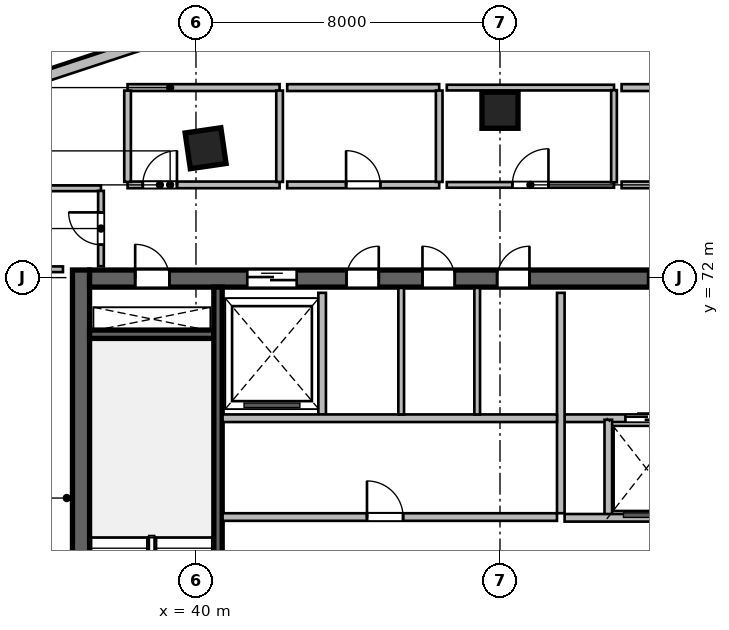
"""IFC4 building model, lengths in metres.
Left out: names, types, materials, properties, quantities, classifications, styles, units other than length and angle.
Written with IfcOpenShell. Run it as: python <this file> out.ifc"""

import sys

from ifc_helpers import new_model, si_unit, direction, frame, frame_2d, origin, origin_2d, place, context, subcontext, project, spatial, rectangle, extrude, source, transform, mapped, element, fill, save


model = new_model("IFC4")
c1 = context("Model", 3, precision=1e-05, world=origin(), true_north=direction((0.0, 1.0)))
c2 = subcontext(c1, "Body", "Model", "MODEL_VIEW")
j1 = project(units=[si_unit("LENGTHUNIT", "METRE"), si_unit("PLANEANGLEUNIT", "RADIAN")], contexts=[c1])
p1 = place(None, origin())
s1 = spatial("IfcSite", under=j1, at=p1, CompositionType="ELEMENT")
p2 = place(p1, origin())
s2 = spatial("IfcBuilding", under=s1, at=p2, CompositionType="ELEMENT")
p3 = place(p2, frame((0.0, 0.0, 239.1)))
s3 = spatial("IfcBuildingStorey", under=s2, at=p3, CompositionType="ELEMENT", Elevation=239.1)
m1 = source(origin(), c2, "Body", "SweptSolid", [
    extrude(rectangle(XDim=12.0, YDim=0.45, at=frame_2d((6.0, 0.0))), origin(), (0.0, 0.0, 1.0), 3.9),
])
p4 = place(p3, frame((36.975, 60.2, 0.0), z_axis=(0.0, 0.0, 1.0), x_axis=(0.0, 1.0, 0.0)))
e1 = element("IfcWall", 1, at=p4, inside=s3, PredefinedType="SHEAR", context=c2, shape_type="MappedRepresentation", body=[
    mapped(m1, transform((0.0, 0.0, 0.0), scale=1.0)),
])
m2 = source(origin(), c2, "Body", "SweptSolid", [
    extrude(rectangle(XDim=21.6, YDim=0.45, at=frame_2d((10.8, 0.0))), origin(), (0.0, 0.0, 1.0), 3.9),
])
p5 = place(p3, frame((37.2, 71.975, 0.0), z_axis=(0.0, 0.0, 1.0), x_axis=(1.0, 0.0, 0.0)))
e2 = element("IfcWall", 2, at=p5, inside=s3, PredefinedType="SHEAR", context=c2, shape_type="MappedRepresentation", body=[
    mapped(m2, transform((0.0, 0.0, 0.0), scale=1.0)),
])
p6 = place(p5, frame((1.2, 0.0, 0.0)))
e3 = element("IfcOpeningElement", 3, at=p6, cuts=e2, PredefinedType="OPENING", context=c2, shape_type="SweptSolid", body=[
    extrude(rectangle(XDim=0.9, YDim=2.1, at=frame_2d((0.45, 1.05))), frame((0.0, 0.235, 0.0), z_axis=(0.0, -1.0, 0.0), x_axis=(1.0, 0.0, 0.0)), (0.0, 0.0, 1.0), 0.47),
])
p7 = place(p5, frame((14.7, 0.0, 0.0)))
e4 = element("IfcOpeningElement", 4, at=p7, cuts=e2, PredefinedType="OPENING", context=c2, shape_type="SweptSolid", body=[
    extrude(rectangle(XDim=1.2, YDim=2.15, at=frame_2d((0.6, 1.075))), frame((0.0, 0.235, 0.0), z_axis=(0.0, -1.0, 0.0), x_axis=(1.0, 0.0, 0.0)), (0.0, 0.0, 1.0), 0.47),
])
p8 = place(p5, frame((4.15, 0.0, 0.0)))
e5 = element("IfcOpeningElement", 5, at=p8, cuts=e2, PredefinedType="OPENING", context=c2, shape_type="SweptSolid", body=[
    extrude(rectangle(XDim=1.3, YDim=2.15, at=frame_2d((0.65, 1.075))), frame((0.0, 0.235, 0.0), z_axis=(0.0, -1.0, 0.0), x_axis=(1.0, 0.0, 0.0)), (0.0, 0.0, 1.0), 0.47),
])
p9 = place(p5, frame((6.76, 0.0, 0.0)))
e6 = element("IfcOpeningElement", 6, at=p9, cuts=e2, PredefinedType="OPENING", context=c2, shape_type="SweptSolid", body=[
    extrude(rectangle(XDim=0.85, YDim=2.1, at=frame_2d((0.425, 1.05))), frame((0.0, 0.235, 0.0), z_axis=(0.0, -1.0, 0.0), x_axis=(1.0, 0.0, 0.0)), (0.0, 0.0, 1.0), 0.47),
])
p10 = place(p5, frame((8.76, 0.0, 0.0)))
e7 = element("IfcOpeningElement", 7, at=p10, cuts=e2, PredefinedType="OPENING", context=c2, shape_type="SweptSolid", body=[
    extrude(rectangle(XDim=0.85, YDim=2.1, at=frame_2d((0.425, 1.05))), frame((0.0, 0.235, 0.0), z_axis=(0.0, -1.0, 0.0), x_axis=(1.0, 0.0, 0.0)), (0.0, 0.0, 1.0), 0.47),
])
p11 = place(p5, frame((10.725, 0.0, 0.0)))
e8 = element("IfcOpeningElement", 8, at=p11, cuts=e2, PredefinedType="OPENING", context=c2, shape_type="SweptSolid", body=[
    extrude(rectangle(XDim=0.85, YDim=2.1, at=frame_2d((0.425, 1.05))), frame((0.0, 0.235, 0.0), z_axis=(0.0, -1.0, 0.0), x_axis=(1.0, 0.0, 0.0)), (0.0, 0.0, 1.0), 0.47),
])
m3 = source(origin(), c2, "Body", "SweptSolid", [
    extrude(rectangle(XDim=3.27, YDim=0.22, at=frame_2d((1.635, 0.0))), origin(), (0.0, 0.0, 1.0), 3.9),
])
p12 = place(p3, frame((37.2, 70.51, 0.0), z_axis=(0.0, 0.0, 1.0), x_axis=(1.0, 0.0, 0.0)))
e9 = element("IfcWall", 9, at=p12, inside=s3, PredefinedType="SHEAR", context=c2, shape_type="MappedRepresentation", body=[
    mapped(m3, transform((0.0, 0.0, 0.0), scale=1.0)),
])
m4 = source(origin(), c2, "Body", "SweptSolid", [
    extrude(rectangle(XDim=11.1, YDim=0.22, at=frame_2d((5.55, 0.0))), origin(), (0.0, 0.0, 1.0), 3.9),
])
p13 = place(p3, frame((40.58, 60.65, 0.0), z_axis=(0.0, 0.0, 1.0), x_axis=(0.0, 1.0, 0.0)))
e10 = element("IfcWall", 10, at=p13, inside=s3, PredefinedType="SHEAR", context=c2, shape_type="MappedRepresentation", body=[
    mapped(m4, transform((0.0, 0.0, 0.0), scale=1.0)),
])
m5 = source(origin(), c2, "Body", "SweptSolid", [
    extrude(rectangle(XDim=0.95, YDim=0.95, at=origin_2d()), origin(), (0.0, 0.0, 1.0), 3.9),
])
for number, where, z_axis, x_axis in (
    (11, (40.253, 75.404, 0.0), (0.0, 0.0, 1.0), (-0.143, 0.99, 0.0)),
    (12, (48.0, 76.404, 0.0), (0.0, 0.0, 1.0), (0.0, 1.0, 0.0)),
):
    element("IfcColumn", number, at=place(p3, frame(where, z_axis=z_axis, x_axis=x_axis)), inside=s3, PredefinedType="COLUMN", context=c2, shape_type="MappedRepresentation", body=[
        mapped(m5, transform((0.0, 0.0, 0.0), scale=1.0)),
    ])
m6 = source(origin(), c2, "Body", "SweptSolid", [
    extrude(rectangle(XDim=3.557, YDim=0.28, at=frame_2d((1.778, 0.0))), origin(), (0.0, 0.0, 1.0), 3.65),
])
p14 = place(p3, frame((36.077, 77.307, 0.0), z_axis=(0.0, 0.0, 1.0), x_axis=(0.949687460385, 0.31319918197, 0.0)))
e13 = element("IfcWall", 13, at=p14, inside=s3, PredefinedType="SOLIDWALL", context=c2, shape_type="MappedRepresentation", body=[
    mapped(m6, transform((0.0, 0.0, 0.0), scale=1.0)),
])
m7 = source(origin(), c2, "Body", "SweptSolid", [
    extrude(rectangle(XDim=5.62, YDim=0.2, at=frame_2d((2.81, 0.0))), origin(), (0.0, 0.0, 1.0), 3.65),
])
p15 = place(p3, frame((49.7, 68.3, 0.0), z_axis=(0.0, 0.0, 1.0), x_axis=(1.0, 0.0, 0.0)))
e14 = element("IfcWall", 14, at=p15, inside=s3, PredefinedType="SOLIDWALL", context=c2, shape_type="MappedRepresentation", body=[
    mapped(m7, transform((0.0, 0.0, 0.0), scale=1.0)),
])
p16 = place(p15, frame((1.6, 0.0, 0.0)))
e15 = element("IfcOpeningElement", 15, at=p16, cuts=e14, PredefinedType="OPENING", context=c2, shape_type="SweptSolid", body=[
    extrude(rectangle(XDim=1.1, YDim=2.15, at=frame_2d((0.55, 1.075))), frame((0.0, 0.11, 0.0), z_axis=(0.0, -1.0, 0.0), x_axis=(1.0, 0.0, 0.0)), (0.0, 0.0, 1.0), 0.22),
])
p17 = place(p15, frame((3.7, 0.0, 0.0)))
e16 = element("IfcOpeningElement", 16, at=p17, cuts=e14, PredefinedType="OPENING", context=c2, shape_type="SweptSolid", body=[
    extrude(rectangle(XDim=1.1, YDim=2.15, at=frame_2d((0.55, 1.075))), frame((0.0, 0.11, 0.0), z_axis=(0.0, -1.0, 0.0), x_axis=(1.0, 0.0, 0.0)), (0.0, 0.0, 1.0), 0.22),
])
m8 = source(origin(), c2, "Body", "SweptSolid", [
    extrude(rectangle(XDim=5.8, YDim=0.2, at=frame_2d((2.9, 0.0))), origin(), (0.0, 0.0, 1.0), 3.65),
])
p18 = place(p3, frame((49.6, 65.8, 0.0), z_axis=(0.0, 0.0, 1.0), x_axis=(0.0, 1.0, 0.0)))
e17 = element("IfcWall", 17, at=p18, inside=s3, PredefinedType="SOLIDWALL", context=c2, shape_type="MappedRepresentation", body=[
    mapped(m8, transform((0.0, 0.0, 0.0), scale=1.0)),
])
m9 = source(origin(), c2, "Body", "SweptSolid", [
    extrude(rectangle(XDim=2.58, YDim=0.2, at=frame_2d((1.29, 0.0))), origin(), (0.0, 0.0, 1.0), 3.65),
])
p19 = place(p3, frame((50.85, 65.68, 0.0), z_axis=(0.0, 0.0, 1.0), x_axis=(0.0, 1.0, 0.0)))
e18 = element("IfcWall", 18, at=p19, inside=s3, PredefinedType="SOLIDWALL", context=c2, shape_type="MappedRepresentation", body=[
    mapped(m9, transform((0.0, 0.0, 0.0), scale=1.0)),
])
p20 = place(p3, frame((49.7, 65.68, 0.0), z_axis=(0.0, 0.0, 1.0), x_axis=(1.0, 0.0, 0.0)))
e19 = element("IfcWall", 19, at=p20, inside=s3, PredefinedType="SOLIDWALL", context=c2, shape_type="MappedRepresentation", body=[
    mapped(m7, transform((0.0, 0.0, 0.0), scale=1.0)),
])
m10 = source(origin(), c2, "Body", "SweptSolid", [
    extrude(rectangle(XDim=3.2, YDim=0.2, at=frame_2d((1.6, 0.0))), origin(), (0.0, 0.0, 1.0), 3.65),
])
p21 = place(p3, frame((43.32, 68.4, 0.0), z_axis=(0.0, 0.0, 1.0), x_axis=(0.0, 1.0, 0.0)))
e20 = element("IfcWall", 20, at=p21, inside=s3, PredefinedType="SOLIDWALL", context=c2, shape_type="MappedRepresentation", body=[
    mapped(m10, transform((0.0, 0.0, 0.0), scale=1.0)),
])
m11 = source(origin(), c2, "Body", "SweptSolid", [
    extrude(rectangle(XDim=8.8, YDim=0.2, at=frame_2d((4.4, 0.0))), origin(), (0.0, 0.0, 1.0), 3.65),
])
p22 = place(p3, frame((40.7, 68.3, 0.0), z_axis=(0.0, 0.0, 1.0), x_axis=(1.0, 0.0, 0.0)))
e21 = element("IfcWall", 21, at=p22, inside=s3, PredefinedType="SOLIDWALL", context=c2, shape_type="MappedRepresentation", body=[
    mapped(m11, transform((0.0, 0.0, 0.0), scale=1.0)),
])
m12 = source(origin(), c2, "Body", "SweptSolid", [
    extrude(rectangle(XDim=3.33, YDim=0.15, at=frame_2d((1.665, 0.0))), origin(), (0.0, 0.0, 1.0), 3.65),
])
for number, where, z_axis, x_axis in (
    (22, (45.4, 68.4, 0.0), (0.0, 0.0, 1.0), (0.0, 1.0, 0.0)),
    (23, (47.4, 68.4, 0.0), (0.0, 0.0, 1.0), (0.0, 1.0, 0.0)),
):
    element("IfcWall", number, at=place(p3, frame(where, z_axis=z_axis, x_axis=x_axis)), inside=s3, PredefinedType="PARTITIONING", context=c2, shape_type="MappedRepresentation", body=[
        mapped(m12, transform((0.0, 0.0, 0.0), scale=1.0)),
    ])
p23 = place(p3, frame((40.7, 65.7, 0.0), z_axis=(0.0, 0.0, 1.0), x_axis=(1.0, 0.0, 0.0)))
e24 = element("IfcWall", 24, at=p23, inside=s3, PredefinedType="SOLIDWALL", context=c2, shape_type="MappedRepresentation", body=[
    mapped(m11, transform((0.0, 0.0, 0.0), scale=1.0)),
])
p24 = place(p23, frame((3.8, 0.0, 0.0)))
e25 = element("IfcOpeningElement", 25, at=p24, cuts=e24, PredefinedType="OPENING", context=c2, shape_type="SweptSolid", body=[
    extrude(rectangle(XDim=0.95, YDim=2.15, at=frame_2d((0.475, 1.075))), frame((0.0, 0.11, 0.0), z_axis=(0.0, -1.0, 0.0), x_axis=(1.0, 0.0, 0.0)), (0.0, 0.0, 1.0), 0.22),
])
m13 = source(origin(), c2, "Body", "SweptSolid", [
    extrude(rectangle(XDim=2.1, YDim=0.15, at=frame_2d((1.05, 0.0))), origin(), (0.0, 0.0, 1.0), 3.65),
])
p25 = place(p3, frame((34.4, 72.22, 0.0), z_axis=(0.0, 0.0, 1.0), x_axis=(1.0, 0.0, 0.0)))
e26 = element("IfcWall", 26, at=p25, inside=s3, PredefinedType="PARTITIONING", context=c2, shape_type="MappedRepresentation", body=[
    mapped(m13, transform((0.0, 0.0, 0.0), scale=1.0)),
])
m14 = source(origin(), c2, "Body", "SweptSolid", [
    extrude(rectangle(XDim=3.1, YDim=0.15, at=frame_2d((1.55, 0.0))), origin(), (0.0, 0.0, 1.0), 3.081),
])
p26 = place(p3, frame((34.4, 74.35, 0.0), z_axis=(0.0, 0.0, 1.0), x_axis=(1.0, 0.0, 0.0)))
e27 = element("IfcWall", 27, at=p26, inside=s3, PredefinedType="PARTITIONING", context=c2, shape_type="MappedRepresentation", body=[
    mapped(m14, transform((0.0, 0.0, 0.0), scale=1.0)),
])
m15 = source(origin(), c2, "Body", "SweptSolid", [
    extrude(rectangle(XDim=1.982, YDim=0.15, at=frame_2d((0.991, 0.0))), origin(), (0.0, 0.0, 1.0), 3.65),
])
p27 = place(p3, frame((37.5, 72.3, 0.0), z_axis=(0.0, 0.0, 1.0), x_axis=(0.0, 1.0, 0.0)))
e28 = element("IfcWall", 28, at=p27, inside=s3, PredefinedType="PARTITIONING", context=c2, shape_type="MappedRepresentation", body=[
    mapped(m15, transform((0.0, 0.0, 0.0), scale=1.0)),
])
p28 = place(p27, frame((0.566, 0.0, 0.0)))
e29 = element("IfcOpeningElement", 29, at=p28, cuts=e28, PredefinedType="OPENING", context=c2, shape_type="SweptSolid", body=[
    extrude(rectangle(XDim=0.85, YDim=2.1, at=frame_2d((0.425, 1.05))), frame((0.0, 0.085, 0.0), z_axis=(0.0, -1.0, 0.0), x_axis=(1.0, 0.0, 0.0)), (0.0, 0.0, 1.0), 0.17),
])
m16 = source(origin(), c2, "Body", "SweptSolid", [
    extrude(rectangle(XDim=4.0, YDim=0.175, at=frame_2d((2.0, 0.0))), origin(), (0.0, 0.0, 1.0), 3.65),
])
p29 = place(p3, frame((38.2, 74.44, 0.0), z_axis=(0.0, 0.0, 1.0), x_axis=(1.0, 0.0, 0.0)))
e30 = element("IfcWall", 30, at=p29, inside=s3, PredefinedType="PARTITIONING", context=c2, shape_type="MappedRepresentation", body=[
    mapped(m16, transform((0.0, 0.0, 0.0), scale=1.0)),
])
p30 = place(p29, frame((0.4, 0.0, 0.0)))
e31 = element("IfcOpeningElement", 31, at=p30, cuts=e30, PredefinedType="OPENING", context=c2, shape_type="SweptSolid", body=[
    extrude(rectangle(XDim=0.9, YDim=2.08, at=frame_2d((0.45, 1.04))), frame((0.0, 0.098, 0.0), z_axis=(0.0, -1.0, 0.0), x_axis=(1.0, 0.0, 0.0)), (0.0, 0.0, 1.0), 0.195),
])
m17 = source(origin(), c2, "Body", "SweptSolid", [
    extrude(rectangle(XDim=4.0, YDim=0.18, at=frame_2d((2.0, 0.0))), origin(), (0.0, 0.0, 1.0), 3.65),
])
p31 = place(p3, frame((38.2, 77.0, 0.0), z_axis=(0.0, 0.0, 1.0), x_axis=(1.0, 0.0, 0.0)))
e32 = element("IfcWall", 32, at=p31, inside=s3, PredefinedType="PLUMBINGWALL", context=c2, shape_type="MappedRepresentation", body=[
    mapped(m17, transform((0.0, 0.0, 0.0), scale=1.0)),
])
m18 = source(origin(), c2, "Body", "SweptSolid", [
    extrude(rectangle(XDim=2.403, YDim=0.175, at=frame_2d((1.201, 0.0))), origin(), (0.0, 0.0, 1.0), 3.65),
])
for number, where, z_axis, x_axis in (
    (33, (38.2, 74.519, 0.0), (0.0, 0.0, 1.0), (0.0, 1.0, 0.0)),
    (34, (42.2, 74.519, 0.0), (0.0, 0.0, 1.0), (0.0, 1.0, 0.0)),
):
    element("IfcWall", number, at=place(p3, frame(where, z_axis=z_axis, x_axis=x_axis)), inside=s3, PredefinedType="PARTITIONING", context=c2, shape_type="MappedRepresentation", body=[
        mapped(m18, transform((0.0, 0.0, 0.0), scale=1.0)),
    ])
p32 = place(p3, frame((42.4, 74.44, 0.0), z_axis=(0.0, 0.0, 1.0), x_axis=(1.0, 0.0, 0.0)))
e35 = element("IfcWall", 35, at=p32, inside=s3, PredefinedType="PARTITIONING", context=c2, shape_type="MappedRepresentation", body=[
    mapped(m16, transform((0.0, 0.0, 0.0), scale=1.0)),
])
p33 = place(p32, frame((1.55, 0.0, 0.0)))
e36 = element("IfcOpeningElement", 36, at=p33, cuts=e35, PredefinedType="OPENING", context=c2, shape_type="SweptSolid", body=[
    extrude(rectangle(XDim=0.9, YDim=2.08, at=frame_2d((0.45, 1.04))), frame((0.0, 0.098, 0.0), z_axis=(0.0, -1.0, 0.0), x_axis=(1.0, 0.0, 0.0)), (0.0, 0.0, 1.0), 0.195),
])
p34 = place(p3, frame((42.4, 77.0, 0.0), z_axis=(0.0, 0.0, 1.0), x_axis=(1.0, 0.0, 0.0)))
e37 = element("IfcWall", 37, at=p34, inside=s3, PredefinedType="PLUMBINGWALL", context=c2, shape_type="MappedRepresentation", body=[
    mapped(m17, transform((0.0, 0.0, 0.0), scale=1.0)),
])
p35 = place(p3, frame((46.4, 74.519, 0.0), z_axis=(0.0, 0.0, 1.0), x_axis=(0.0, 1.0, 0.0)))
e38 = element("IfcWall", 38, at=p35, inside=s3, PredefinedType="PARTITIONING", context=c2, shape_type="MappedRepresentation", body=[
    mapped(m18, transform((0.0, 0.0, 0.0), scale=1.0)),
])
m19 = source(origin(), c2, "Body", "SweptSolid", [
    extrude(rectangle(XDim=4.4, YDim=0.15, at=frame_2d((2.2, 0.0))), origin(), (0.0, 0.0, 1.0), 3.65),
])
p36 = place(p3, frame((46.6, 74.44, 0.0), z_axis=(0.0, 0.0, 1.0), x_axis=(1.0, 0.0, 0.0)))
e39 = element("IfcWall", 39, at=p36, inside=s3, PredefinedType="PARTITIONING", context=c2, shape_type="MappedRepresentation", body=[
    mapped(m19, transform((0.0, 0.0, 0.0), scale=1.0)),
])
p37 = place(p36, frame((1.725, 0.0, 0.0)))
e40 = element("IfcOpeningElement", 40, at=p37, cuts=e39, PredefinedType="OPENING", context=c2, shape_type="SweptSolid", body=[
    extrude(rectangle(XDim=0.95, YDim=2.1, at=frame_2d((0.475, 1.05))), frame((0.0, 0.085, 0.0), z_axis=(0.0, -1.0, 0.0), x_axis=(1.0, 0.0, 0.0)), (0.0, 0.0, 1.0), 0.17),
])
p38 = place(p3, frame((46.6, 77.0, 0.0), z_axis=(0.0, 0.0, 1.0), x_axis=(1.0, 0.0, 0.0)))
e41 = element("IfcWall", 41, at=p38, inside=s3, PredefinedType="PARTITIONING", context=c2, shape_type="MappedRepresentation", body=[
    mapped(m19, transform((0.0, 0.0, 0.0), scale=1.0)),
])
m20 = source(origin(), c2, "Body", "SweptSolid", [
    extrude(rectangle(XDim=2.425, YDim=0.15, at=frame_2d((1.212, 0.0))), origin(), (0.0, 0.0, 1.0), 3.65),
])
p39 = place(p3, frame((51.0, 74.508, 0.0), z_axis=(0.0, 0.0, 1.0), x_axis=(0.0, 1.0, 0.0)))
e42 = element("IfcWall", 42, at=p39, inside=s3, PredefinedType="PARTITIONING", context=c2, shape_type="MappedRepresentation", body=[
    mapped(m20, transform((0.0, 0.0, 0.0), scale=1.0)),
])
m21 = source(origin(), c2, "Body", "SweptSolid", [
    extrude(rectangle(XDim=4.2, YDim=0.175, at=frame_2d((2.1, 0.0))), origin(), (0.0, 0.0, 1.0), 3.65),
])
p40 = place(p3, frame((51.2, 74.44, 0.0), z_axis=(0.0, 0.0, 1.0), x_axis=(1.0, 0.0, 0.0)))
e43 = element("IfcWall", 43, at=p40, inside=s3, PredefinedType="PARTITIONING", context=c2, shape_type="MappedRepresentation", body=[
    mapped(m21, transform((0.0, 0.0, 0.0), scale=1.0)),
])
p41 = place(p40, frame((1.625, 0.0, 0.0)))
e44 = element("IfcOpeningElement", 44, at=p41, cuts=e43, PredefinedType="OPENING", context=c2, shape_type="SweptSolid", body=[
    extrude(rectangle(XDim=0.95, YDim=2.12, at=frame_2d((0.475, 1.06))), frame((0.0, 0.098, 0.0), z_axis=(0.0, -1.0, 0.0), x_axis=(1.0, 0.0, 0.0)), (0.0, 0.0, 1.0), 0.195),
])
m22 = source(origin(), c2, "Body", "SweptSolid", [
    extrude(rectangle(XDim=4.2, YDim=0.18, at=frame_2d((2.1, 0.0))), origin(), (0.0, 0.0, 1.0), 3.65),
])
p42 = place(p3, frame((51.2, 77.0, 0.0), z_axis=(0.0, 0.0, 1.0), x_axis=(1.0, 0.0, 0.0)))
e45 = element("IfcWall", 45, at=p42, inside=s3, PredefinedType="PLUMBINGWALL", context=c2, shape_type="MappedRepresentation", body=[
    mapped(m22, transform((0.0, 0.0, 0.0), scale=1.0)),
])
m23 = source(origin(), c2, "Body", "SweptSolid", [
    extrude(rectangle(XDim=0.9, YDim=2.1, at=frame_2d((0.45, 1.05))), frame((0.0, 0.025, 0.0), z_axis=(0.0, -1.0, 0.0), x_axis=(1.0, 0.0, 0.0)), (0.0, 0.0, 1.0), 0.05),
])
p43 = place(p6, origin())
e46 = element("IfcDoor", 46, at=p43, inside=s3, OperationType="SINGLE_SWING_LEFT", PredefinedType="DOOR", context=c2, shape_type="MappedRepresentation", body=[
    mapped(m23, transform((0.0, 0.0, 0.0), scale=1.0)),
])
fill(e3, e46)
m24 = source(origin(), c2, "Body", "SweptSolid", [
    extrude(rectangle(XDim=1.2, YDim=2.15, at=frame_2d((0.6, 1.075))), frame((0.0, 0.025, 0.0), z_axis=(0.0, -1.0, 0.0), x_axis=(1.0, 0.0, 0.0)), (0.0, 0.0, 1.0), 0.05),
])
p44 = place(p7, origin())
e47 = element("IfcDoor", 47, at=p44, inside=s3, OperationType="SINGLE_SWING_RIGHT", PredefinedType="DOOR", context=c2, shape_type="MappedRepresentation", body=[
    mapped(m24, transform((0.0, 0.0, 0.0), scale=1.0)),
])
fill(e4, e47)
m25 = source(origin(), c2, "Body", "SweptSolid", [
    extrude(rectangle(XDim=1.1, YDim=2.15, at=frame_2d((0.55, 1.075))), frame((0.0, 0.025, 0.0), z_axis=(0.0, -1.0, 0.0), x_axis=(1.0, 0.0, 0.0)), (0.0, 0.0, 1.0), 0.05),
])
p45 = place(p16, origin())
e48 = element("IfcDoor", 48, at=p45, inside=s3, OperationType="DOUBLE_DOOR_SLIDING", PredefinedType="DOOR", context=c2, shape_type="MappedRepresentation", body=[
    mapped(m25, transform((0.0, 0.0, 0.0), scale=1.0)),
])
fill(e15, e48)
m26 = source(origin(), c2, "Body", "SweptSolid", [
    extrude(rectangle(XDim=1.3, YDim=2.15, at=frame_2d((0.65, 1.075))), frame((0.0, 0.025, 0.0), z_axis=(0.0, -1.0, 0.0), x_axis=(1.0, 0.0, 0.0)), (0.0, 0.0, 1.0), 0.05),
])
p46 = place(p8, origin())
e49 = element("IfcDoor", 49, at=p46, inside=s3, OperationType="DOUBLE_DOOR_SLIDING", PredefinedType="DOOR", context=c2, shape_type="MappedRepresentation", body=[
    mapped(m26, transform((0.0, 0.0, 0.0), scale=1.0)),
])
fill(e5, e49)
m27 = source(origin(), c2, "Body", "SweptSolid", [
    extrude(rectangle(XDim=0.85, YDim=2.1, at=frame_2d((0.425, 1.05))), frame((0.0, 0.025, 0.0), z_axis=(0.0, -1.0, 0.0), x_axis=(1.0, 0.0, 0.0)), (0.0, 0.0, 1.0), 0.05),
])
p47 = place(p9, origin())
e50 = element("IfcDoor", 50, at=p47, inside=s3, OperationType="SINGLE_SWING_RIGHT", PredefinedType="DOOR", context=c2, shape_type="MappedRepresentation", body=[
    mapped(m27, transform((0.0, 0.0, 0.0), scale=1.0)),
])
fill(e6, e50)
p48 = place(p10, origin())
e51 = element("IfcDoor", 51, at=p48, inside=s3, OperationType="SINGLE_SWING_LEFT", PredefinedType="DOOR", context=c2, shape_type="MappedRepresentation", body=[
    mapped(m27, transform((0.0, 0.0, 0.0), scale=1.0)),
])
fill(e7, e51)
p49 = place(p11, origin())
e52 = element("IfcDoor", 52, at=p49, inside=s3, OperationType="SINGLE_SWING_RIGHT", PredefinedType="DOOR", context=c2, shape_type="MappedRepresentation", body=[
    mapped(m27, transform((0.0, 0.0, 0.0), scale=1.0)),
])
fill(e8, e52)
m28 = source(origin(), c2, "Body", "SweptSolid", [
    extrude(rectangle(XDim=0.95, YDim=2.15, at=frame_2d((0.475, 1.075))), frame((0.0, 0.025, 0.0), z_axis=(0.0, -1.0, 0.0), x_axis=(1.0, 0.0, 0.0)), (0.0, 0.0, 1.0), 0.05),
])
p50 = place(p24, origin())
e53 = element("IfcDoor", 53, at=p50, inside=s3, OperationType="SINGLE_SWING_LEFT", PredefinedType="DOOR", context=c2, shape_type="MappedRepresentation", body=[
    mapped(m28, transform((0.0, 0.0, 0.0), scale=1.0)),
])
fill(e25, e53)
p51 = place(p28, origin())
e54 = element("IfcDoor", 54, at=p51, inside=s3, OperationType="SINGLE_SWING_RIGHT", PredefinedType="DOOR", context=c2, shape_type="MappedRepresentation", body=[
    mapped(m27, transform((0.0, 0.0, 0.0), scale=1.0)),
])
fill(e29, e54)
m29 = source(origin(), c2, "Body", "SweptSolid", [
    extrude(rectangle(XDim=0.9, YDim=2.08, at=frame_2d((0.45, 1.04))), frame((0.0, 0.025, 0.0), z_axis=(0.0, -1.0, 0.0), x_axis=(1.0, 0.0, 0.0)), (0.0, 0.0, 1.0), 0.05),
])
p52 = place(p30, origin())
e55 = element("IfcDoor", 55, at=p52, inside=s3, OperationType="SINGLE_SWING_RIGHT", PredefinedType="DOOR", context=c2, shape_type="MappedRepresentation", body=[
    mapped(m29, transform((0.0, 0.0, 0.0), scale=1.0)),
])
fill(e31, e55)
p53 = place(p33, origin())
e56 = element("IfcDoor", 56, at=p53, inside=s3, OperationType="SINGLE_SWING_LEFT", PredefinedType="DOOR", context=c2, shape_type="MappedRepresentation", body=[
    mapped(m29, transform((0.0, 0.0, 0.0), scale=1.0)),
])
fill(e36, e56)
m30 = source(origin(), c2, "Body", "SweptSolid", [
    extrude(rectangle(XDim=0.95, YDim=2.1, at=frame_2d((0.475, 1.05))), frame((0.0, 0.025, 0.0), z_axis=(0.0, -1.0, 0.0), x_axis=(1.0, 0.0, 0.0)), (0.0, 0.0, 1.0), 0.05),
])
p54 = place(p37, origin())
e57 = element("IfcDoor", 57, at=p54, inside=s3, OperationType="SINGLE_SWING_RIGHT", PredefinedType="DOOR", context=c2, shape_type="MappedRepresentation", body=[
    mapped(m30, transform((0.0, 0.0, 0.0), scale=1.0)),
])
fill(e40, e57)
save(model, sys.argv[1])
